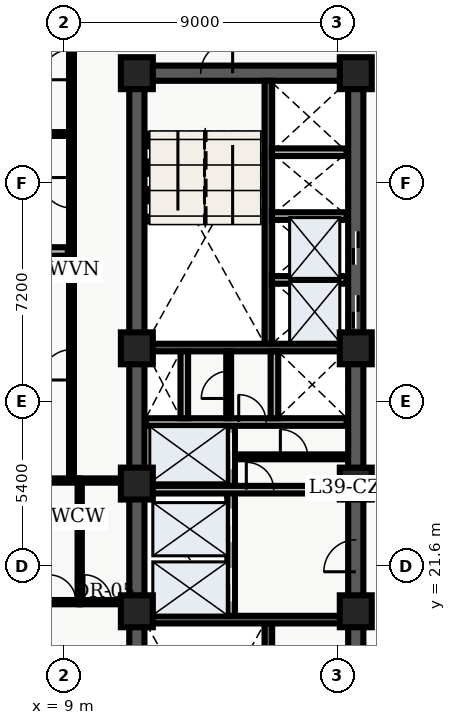
"""IFC4 building model, lengths in metres.
Left out: names, types, materials, properties, quantities, classifications, styles, units other than length and angle.
Written with IfcOpenShell. Run it as: python <this file> out.ifc"""

import sys

from ifc_helpers import new_model, entity, si_unit, converted_unit, direction, frame, origin_with_axes, origin_2d_with_axis, place, context, subcontext, project, spatial, polyline, rectangle, outline, extrude, element, fill, save


model = new_model("IFC4")
c1 = context("Model", 3, precision=1e-05, world=origin_with_axes(), true_north=direction((0.0, 1.0)))
c2 = subcontext(c1, "Body", "Model", "MODEL_VIEW")
j1 = project(units=[si_unit("LENGTHUNIT", "METRE"), converted_unit("PLANEANGLEUNIT", "DEGREE", entity("IfcPlaneAngleMeasure", 0.017), si_unit("PLANEANGLEUNIT", "RADIAN"), dimensions=[0, 0, 0, 0, 0, 0, 0])], contexts=[c1])
p1 = place(None, origin_with_axes())
s1 = spatial("IfcSite", under=j1, at=p1, CompositionType="ELEMENT")
p2 = place(p1, origin_with_axes())
s2 = spatial("IfcBuilding", under=s1, at=p2, CompositionType="ELEMENT")
p3 = place(p2, frame((0.0, 0.0, 160.2), z_axis=(0.0, 0.0, 1.0), x_axis=(1.0, 0.0, 0.0)))
s3 = spatial("IfcBuildingStorey", under=s2, at=p3, CompositionType="ELEMENT", Elevation=160.2)
p4 = place(p3, frame((11.4, 10.8, 0.0), z_axis=(0.0, 0.0, 1.0), x_axis=(0.0, 1.0, 0.0)))
e1 = element("IfcWall", 1, at=p4, inside=s3, PredefinedType="SHEAR", context=c2, shape_type="SweptSolid", body=[
    extrude(outline(polyline([(0.0, -0.25), (27.0, -0.25), (27.0, 0.25), (0.0, 0.25), (0.0, -0.25)])), origin_with_axes(), (0.0, 0.0, 1.0), 3.66),
])
p5 = place(p3, frame((11.4, 37.8, 0.0), z_axis=(0.0, 0.0, 1.0), x_axis=(1.0, 0.0, 0.0)))
e2 = element("IfcWall", 2, at=p5, inside=s3, PredefinedType="SHEAR", context=c2, shape_type="SweptSolid", body=[
    extrude(outline(polyline([(0.0, -0.25), (7.2, -0.25), (7.2, 0.25), (0.0, 0.25), (0.0, -0.25)])), origin_with_axes(), (0.0, 0.0, 1.0), 3.66),
])
p6 = place(p5, frame((2.625, 0.0, 0.0), z_axis=(0.0, 0.0, 1.0), x_axis=(1.0, 0.0, 0.0)))
e3 = element("IfcOpeningElement", 3, at=p6, cuts=e2, PredefinedType="OPENING", context=c2, shape_type="SweptSolid", body=[
    extrude(rectangle(XDim=1.05, YDim=0.52, at=origin_2d_with_axis()), origin_with_axes(), (0.0, 0.0, 1.0), 2.15),
])
p7 = place(p3, frame((18.6, 10.8, 0.0), z_axis=(0.0, 0.0, 1.0), x_axis=(0.0, 1.0, 0.0)))
e4 = element("IfcWall", 4, at=p7, inside=s3, PredefinedType="SHEAR", context=c2, shape_type="SweptSolid", body=[
    extrude(outline(polyline([(0.0, -0.25), (13.5, -0.25), (13.5, 0.25), (0.0, 0.25), (0.0, -0.25)])), origin_with_axes(), (0.0, 0.0, 1.0), 3.66),
])
p8 = place(p7, frame((11.125, 0.0, 0.0), z_axis=(0.0, 0.0, 1.0), x_axis=(1.0, 0.0, 0.0)))
e5 = element("IfcOpeningElement", 5, at=p8, cuts=e4, PredefinedType="OPENING", context=c2, shape_type="SweptSolid", body=[
    extrude(rectangle(XDim=1.05, YDim=0.52, at=origin_2d_with_axis()), origin_with_axes(), (0.0, 0.0, 1.0), 2.15),
])
p9 = place(p7, frame((2.425, 0.0, 0.0), z_axis=(0.0, 0.0, 1.0), x_axis=(1.0, 0.0, 0.0)))
e6 = element("IfcOpeningElement", 6, at=p9, cuts=e4, PredefinedType="OPENING", context=c2, shape_type="SweptSolid", body=[
    extrude(rectangle(XDim=1.05, YDim=0.52, at=origin_2d_with_axis()), origin_with_axes(), (0.0, 0.0, 1.0), 2.15),
])
p10 = place(p7, frame((6.625, 0.0, 0.0), z_axis=(0.0, 0.0, 1.0), x_axis=(1.0, 0.0, 0.0)))
e7 = element("IfcOpeningElement", 7, at=p10, cuts=e4, PredefinedType="OPENING", context=c2, shape_type="SweptSolid", body=[
    extrude(rectangle(XDim=1.05, YDim=0.52, at=origin_2d_with_axis()), origin_with_axes(), (0.0, 0.0, 1.0), 2.15),
])
p11 = place(p3, frame((18.6, 24.3, 0.0), z_axis=(0.0, 0.0, 1.0), x_axis=(0.0, 1.0, 0.0)))
e8 = element("IfcWall", 8, at=p11, inside=s3, PredefinedType="SHEAR", context=c2, shape_type="SweptSolid", body=[
    extrude(outline(polyline([(0.0, -0.25), (13.5, -0.25), (13.5, 0.25), (0.0, 0.25), (0.0, -0.25)])), origin_with_axes(), (0.0, 0.0, 1.0), 3.66),
])
p12 = place(p11, frame((5.65, 0.0, 0.0), z_axis=(0.0, 0.0, 1.0), x_axis=(1.0, 0.0, 0.0)))
e9 = element("IfcOpeningElement", 9, at=p12, cuts=e8, PredefinedType="OPENING", context=c2, shape_type="SweptSolid", body=[
    extrude(rectangle(XDim=1.1, YDim=0.52, at=origin_2d_with_axis()), origin_with_axes(), (0.0, 0.0, 1.0), 2.15),
])
p13 = place(p11, frame((7.75, 0.0, 0.0), z_axis=(0.0, 0.0, 1.0), x_axis=(1.0, 0.0, 0.0)))
e10 = element("IfcOpeningElement", 10, at=p13, cuts=e8, PredefinedType="OPENING", context=c2, shape_type="SweptSolid", body=[
    extrude(rectangle(XDim=1.1, YDim=0.52, at=origin_2d_with_axis()), origin_with_axes(), (0.0, 0.0, 1.0), 2.15),
])
p14 = place(p3, frame((15.725, 11.05, 0.0), z_axis=(0.0, 0.0, 1.0), x_axis=(0.0, 1.0, 0.0)))
e11 = element("IfcWall", 11, at=p14, inside=s3, PredefinedType="SHEAR", context=c2, shape_type="SweptSolid", body=[
    extrude(outline(polyline([(0.0, -0.125), (8.65, -0.125), (8.65, 0.125), (0.0, 0.125), (0.0, -0.125)])), origin_with_axes(), (0.0, 0.0, 1.0), 3.66),
])
p15 = place(p3, frame((11.65, 19.825, 0.0), z_axis=(0.0, 0.0, 1.0), x_axis=(1.0, 0.0, 0.0)))
e12 = element("IfcWall", 12, at=p15, inside=s3, PredefinedType="SHEAR", context=c2, shape_type="SweptSolid", body=[
    extrude(outline(polyline([(0.0, -0.125), (6.7, -0.125), (6.7, 0.125), (0.0, 0.125), (0.0, -0.125)])), origin_with_axes(), (0.0, 0.0, 1.0), 3.66),
])
p16 = place(p3, frame((15.725, 28.9, 0.0), z_axis=(0.0, 0.0, 1.0), x_axis=(0.0, 1.0, 0.0)))
e13 = element("IfcWall", 13, at=p16, inside=s3, PredefinedType="SHEAR", context=c2, shape_type="SweptSolid", body=[
    extrude(outline(polyline([(0.0, -0.125), (8.65, -0.125), (8.65, 0.125), (0.0, 0.125), (0.0, -0.125)])), origin_with_axes(), (0.0, 0.0, 1.0), 3.66),
])
p17 = place(p3, frame((11.65, 28.775, 0.0), z_axis=(0.0, 0.0, 1.0), x_axis=(1.0, 0.0, 0.0)))
e14 = element("IfcWall", 14, at=p17, inside=s3, PredefinedType="SHEAR", context=c2, shape_type="SweptSolid", body=[
    extrude(outline(polyline([(0.0, -0.125), (6.7, -0.125), (6.7, 0.125), (0.0, 0.125), (0.0, -0.125)])), origin_with_axes(), (0.0, 0.0, 1.0), 3.66),
])
p18 = place(p3, frame((14.5, 19.95, 0.0), z_axis=(0.0, 0.0, 1.0), x_axis=(0.0, 1.0, 0.0)))
e15 = element("IfcWall", 15, at=p18, inside=s3, PredefinedType="SOLIDWALL", context=c2, shape_type="SweptSolid", body=[
    extrude(outline(polyline([(0.0, -0.125), (6.25, -0.125), (6.25, 0.125), (0.0, 0.125), (0.0, -0.125)])), origin_with_axes(), (0.0, 0.0, 1.0), 2.7),
])
p19 = place(p18, frame((1.025, 0.0, 0.0), z_axis=(0.0, 0.0, 1.0), x_axis=(1.0, 0.0, 0.0)))
e16 = element("IfcOpeningElement", 16, at=p19, cuts=e15, PredefinedType="OPENING", context=c2, shape_type="SweptSolid", body=[
    extrude(rectangle(XDim=1.1, YDim=0.27, at=origin_2d_with_axis()), origin_with_axes(), (0.0, 0.0, 1.0), 2.15),
])
p20 = place(p18, frame((2.975, 0.0, 0.0), z_axis=(0.0, 0.0, 1.0), x_axis=(1.0, 0.0, 0.0)))
e17 = element("IfcOpeningElement", 17, at=p20, cuts=e15, PredefinedType="OPENING", context=c2, shape_type="SweptSolid", body=[
    extrude(rectangle(XDim=1.1, YDim=0.27, at=origin_2d_with_axis()), origin_with_axes(), (0.0, 0.0, 1.0), 2.15),
])
p21 = place(p18, frame((5.425, 0.0, 0.0), z_axis=(0.0, 0.0, 1.0), x_axis=(1.0, 0.0, 0.0)))
e18 = element("IfcOpeningElement", 18, at=p21, cuts=e15, PredefinedType="OPENING", context=c2, shape_type="SweptSolid", body=[
    extrude(rectangle(XDim=1.2, YDim=0.27, at=origin_2d_with_axis()), origin_with_axes(), (0.0, 0.0, 1.0), 2.15),
])
p22 = place(p3, frame((11.7, 24.1, 0.0), z_axis=(0.0, 0.0, 1.0), x_axis=(1.0, 0.0, 0.0)))
e19 = element("IfcWall", 19, at=p22, inside=s3, PredefinedType="SOLIDWALL", context=c2, shape_type="SweptSolid", body=[
    extrude(outline(polyline([(0.0, -0.125), (6.6, -0.125), (6.6, 0.125), (0.0, 0.125), (0.0, -0.125)])), origin_with_axes(), (0.0, 0.0, 1.0), 2.7),
])
p23 = place(p22, frame((3.75, 0.0, 0.0), z_axis=(0.0, 0.0, 1.0), x_axis=(1.0, 0.0, 0.0)))
e20 = element("IfcOpeningElement", 20, at=p23, cuts=e19, PredefinedType="OPENING", context=c2, shape_type="SweptSolid", body=[
    extrude(rectangle(XDim=0.9, YDim=0.27, at=origin_2d_with_axis()), origin_with_axes(), (0.0, 0.0, 1.0), 2.15),
])
p24 = place(p3, frame((11.7, 26.325, 0.0), z_axis=(0.0, 0.0, 1.0), x_axis=(1.0, 0.0, 0.0)))
e21 = element("IfcWall", 21, at=p24, inside=s3, PredefinedType="SOLIDWALL", context=c2, shape_type="SweptSolid", body=[
    extrude(outline(polyline([(0.0, -0.125), (6.6, -0.125), (6.6, 0.125), (0.0, 0.125), (0.0, -0.125)])), origin_with_axes(), (0.0, 0.0, 1.0), 2.7),
])
p25 = place(p24, frame((3.5, 0.0, 0.0), z_axis=(0.0, 0.0, 1.0), x_axis=(1.0, 0.0, 0.0)))
e22 = element("IfcOpeningElement", 22, at=p25, cuts=e21, PredefinedType="OPENING", context=c2, shape_type="SweptSolid", body=[
    extrude(rectangle(XDim=0.9, YDim=0.27, at=origin_2d_with_axis()), origin_with_axes(), (0.0, 0.0, 1.0), 2.15),
])
for number, where, z_axis, x_axis in (
    (23, (12.96, 26.45, 0.0), (0.0, 0.0, 1.0), (0.0, 1.0, 0.0)),
    (24, (15.925, 26.45, 0.0), (0.0, 0.0, 1.0), (0.0, 1.0, 0.0)),
):
    element("IfcWall", number, at=place(p3, frame(where, z_axis=z_axis, x_axis=x_axis)), inside=s3, PredefinedType="SOLIDWALL", context=c2, shape_type="SweptSolid", body=[
        extrude(outline(polyline([(0.0, -0.125), (2.2, -0.125), (2.2, 0.125), (0.0, 0.125), (0.0, -0.125)])), origin_with_axes(), (0.0, 0.0, 1.0), 2.7),
    ])
for number, where, z_axis, x_axis in (
    (25, (11.4, 20.1, 0.0), (0.0, 0.0, 1.0), (1.0, 0.0, 0.0)),
    (26, (11.4, 24.3, 0.0), (0.0, 0.0, 1.0), (1.0, 0.0, 0.0)),
    (27, (11.4, 28.75, 0.0), (0.0, 0.0, 1.0), (1.0, 0.0, 0.0)),
    (28, (11.4, 37.8, 0.0), (0.0, 0.0, 1.0), (1.0, 0.0, 0.0)),
    (29, (18.6, 20.1, 0.0), (0.0, 0.0, 1.0), (1.0, 0.0, 0.0)),
    (30, (18.6, 24.3, 0.0), (0.0, 0.0, 1.0), (1.0, 0.0, 0.0)),
    (31, (18.6, 28.75, 0.0), (0.0, 0.0, 1.0), (1.0, 0.0, 0.0)),
    (32, (18.6, 37.8, 0.0), (0.0, 0.0, 1.0), (1.0, 0.0, 0.0)),
):
    element("IfcColumn", number, at=place(p3, frame(where, z_axis=z_axis, x_axis=x_axis)), inside=s3, PredefinedType="COLUMN", context=c2, shape_type="SweptSolid", body=[
        extrude(rectangle(XDim=1.05, YDim=1.05, at=origin_2d_with_axis()), origin_with_axes(), (0.0, 0.0, 1.0), 3.9),
    ])
p26 = place(p3, frame((14.62, 25.18, 0.0), z_axis=(0.0, 0.0, 1.0), x_axis=(1.0, 0.0, 0.0)))
e33 = element("IfcWall", 33, at=p26, inside=s3, PredefinedType="PARTITIONING", context=c2, shape_type="SweptSolid", body=[
    extrude(outline(polyline([(0.0, -0.08), (3.68, -0.08), (3.68, 0.08), (0.0, 0.08), (0.0, -0.08)])), origin_with_axes(), (0.0, 0.0, 1.0), 2.7),
])
p27 = place(p26, frame((1.95, 0.0, 0.0), z_axis=(0.0, 0.0, 1.0), x_axis=(1.0, 0.0, 0.0)))
e34 = element("IfcOpeningElement", 34, at=p27, cuts=e33, PredefinedType="OPENING", context=c2, shape_type="SweptSolid", body=[
    extrude(rectangle(XDim=0.9, YDim=0.18, at=origin_2d_with_axis()), origin_with_axes(), (0.0, 0.0, 1.0), 2.15),
])
p28 = place(p3, frame((14.42, 26.45, 0.0), z_axis=(0.0, 0.0, 1.0), x_axis=(0.0, 1.0, 0.0)))
e35 = element("IfcWall", 35, at=p28, inside=s3, PredefinedType="PARTITIONING", context=c2, shape_type="SweptSolid", body=[
    extrude(outline(polyline([(0.0, -0.08), (2.2, -0.08), (2.2, 0.08), (0.0, 0.08), (0.0, -0.08)])), origin_with_axes(), (0.0, 0.0, 1.0), 2.7),
])
p29 = place(p28, frame((1.1, 0.0, 0.0), z_axis=(0.0, 0.0, 1.0), x_axis=(1.0, 0.0, 0.0)))
e36 = element("IfcOpeningElement", 36, at=p29, cuts=e35, PredefinedType="OPENING", context=c2, shape_type="SweptSolid", body=[
    extrude(rectangle(XDim=0.9, YDim=0.18, at=origin_2d_with_axis()), origin_with_axes(), (0.0, 0.0, 1.0), 2.15),
])
for number, where, z_axis, x_axis in (
    (37, (15.84, 31.0, 0.0), (0.0, 0.0, 1.0), (1.0, 0.0, 0.0)),
    (38, (15.84, 33.1, 0.0), (0.0, 0.0, 1.0), (1.0, 0.0, 0.0)),
    (39, (15.84, 35.2, 0.0), (0.0, 0.0, 1.0), (1.0, 0.0, 0.0)),
):
    element("IfcWall", number, at=place(p3, frame(where, z_axis=z_axis, x_axis=x_axis)), inside=s3, PredefinedType="SOLIDWALL", context=c2, shape_type="SweptSolid", body=[
        extrude(outline(polyline([(0.0, -0.125), (2.46, -0.125), (2.46, 0.125), (0.0, 0.125), (0.0, -0.125)])), origin_with_axes(), (0.0, 0.0, 1.0), 2.7),
    ])
p30 = place(p3, frame((9.52, 20.4, 0.0), z_axis=(0.0, 0.0, 1.0), x_axis=(0.0, 1.0, 0.0)))
e40 = element("IfcWall", 40, at=p30, inside=s3, PredefinedType="PARTITIONING", context=c2, shape_type="SweptSolid", body=[
    extrude(outline(polyline([(0.0, -0.07), (4.0, -0.07), (4.0, 0.07), (0.0, 0.07), (0.0, -0.07)])), origin_with_axes(), (0.0, 0.0, 1.0), 2.7),
])
p31 = place(p3, frame((9.52, 20.4, 0.0), z_axis=(0.0, 0.0, 1.0), x_axis=(1.0, 0.0, 0.0)))
e41 = element("IfcWall", 41, at=p31, inside=s3, PredefinedType="PARTITIONING", context=c2, shape_type="SweptSolid", body=[
    extrude(outline(polyline([(0.0, -0.07), (1.58, -0.07), (1.58, 0.07), (0.0, 0.07), (0.0, -0.07)])), origin_with_axes(), (0.0, 0.0, 1.0), 2.7),
])
p32 = place(p31, frame((0.59, 0.0, 0.0), z_axis=(0.0, 0.0, 1.0), x_axis=(1.0, 0.0, 0.0)))
e42 = element("IfcOpeningElement", 42, at=p32, cuts=e41, PredefinedType="OPENING", context=c2, shape_type="SweptSolid", body=[
    extrude(rectangle(XDim=0.9, YDim=0.16, at=origin_2d_with_axis()), origin_with_axes(), (0.0, 0.0, 1.0), 2.15),
])
p33 = place(p3, frame((9.52, 24.4, 0.0), z_axis=(0.0, 0.0, 1.0), x_axis=(1.0, 0.0, 0.0)))
e43 = element("IfcWall", 43, at=p33, inside=s3, PredefinedType="PARTITIONING", context=c2, shape_type="SweptSolid", body=[
    extrude(outline(polyline([(0.0, -0.07), (1.58, -0.07), (1.58, 0.07), (0.0, 0.07), (0.0, -0.07)])), origin_with_axes(), (0.0, 0.0, 1.0), 2.7),
])
p34 = place(p3, frame((9.25, 24.4, 0.0), z_axis=(0.0, 0.0, 1.0), x_axis=(0.0, 1.0, 0.0)))
e44 = element("IfcWall", 44, at=p34, inside=s3, PredefinedType="PARTITIONING", context=c2, shape_type="SweptSolid", body=[
    extrude(outline(polyline([(0.0, -0.08), (16.1, -0.08), (16.1, 0.08), (0.0, 0.08), (0.0, -0.08)])), origin_with_axes(), (0.0, 0.0, 1.0), 2.7),
])
p35 = place(p34, frame((3.808, 0.0, 0.0), z_axis=(0.0, 0.0, 1.0), x_axis=(1.0, 0.0, 0.0)))
e45 = element("IfcOpeningElement", 45, at=p35, cuts=e44, PredefinedType="OPENING", context=c2, shape_type="SweptSolid", body=[
    extrude(rectangle(XDim=1.0, YDim=0.18, at=origin_2d_with_axis()), origin_with_axes(), (0.0, 0.0, 1.0), 2.15),
])
p36 = place(p34, frame((9.467, 0.0, 0.0), z_axis=(0.0, 0.0, 1.0), x_axis=(1.0, 0.0, 0.0)))
e46 = element("IfcOpeningElement", 46, at=p36, cuts=e44, PredefinedType="OPENING", context=c2, shape_type="SweptSolid", body=[
    extrude(rectangle(XDim=1.0, YDim=0.18, at=origin_2d_with_axis()), origin_with_axes(), (0.0, 0.0, 1.0), 2.15),
])
p37 = place(p34, frame((13.684, 0.0, 0.0), z_axis=(0.0, 0.0, 1.0), x_axis=(1.0, 0.0, 0.0)))
e47 = element("IfcOpeningElement", 47, at=p37, cuts=e44, PredefinedType="OPENING", context=c2, shape_type="SweptSolid", body=[
    extrude(rectangle(XDim=1.0, YDim=0.18, at=origin_2d_with_axis()), origin_with_axes(), (0.0, 0.0, 1.0), 2.15),
])
p38 = place(p3, frame((0.335, 20.4, 0.0), z_axis=(0.0, 0.0, 1.0), x_axis=(1.0, 0.0, 0.0)))
e48 = element("IfcWall", 48, at=p38, inside=s3, PredefinedType="PARTITIONING", context=c2, shape_type="SweptSolid", body=[
    extrude(outline(polyline([(0.0, -0.07), (9.185, -0.07), (9.185, 0.07), (0.0, 0.07), (0.0, -0.07)])), origin_with_axes(), (0.0, 0.0, 1.0), 2.7),
])
p39 = place(p38, frame((8.615, 0.0, 0.0), z_axis=(0.0, 0.0, 1.0), x_axis=(1.0, 0.0, 0.0)))
e49 = element("IfcOpeningElement", 49, at=p39, cuts=e48, PredefinedType="OPENING", context=c2, shape_type="SweptSolid", body=[
    extrude(rectangle(XDim=0.9, YDim=0.16, at=origin_2d_with_axis()), origin_with_axes(), (0.0, 0.0, 1.0), 2.15),
])
p40 = place(p3, frame((0.335, 24.4, 0.0), z_axis=(0.0, 0.0, 1.0), x_axis=(1.0, 0.0, 0.0)))
e50 = element("IfcWall", 50, at=p40, inside=s3, PredefinedType="PARTITIONING", context=c2, shape_type="SweptSolid", body=[
    extrude(outline(polyline([(0.0, -0.07), (9.185, -0.07), (9.185, 0.07), (0.0, 0.07), (0.0, -0.07)])), origin_with_axes(), (0.0, 0.0, 1.0), 2.7),
])
p41 = place(p3, frame((0.335, 31.935, 0.0), z_axis=(0.0, 0.0, 1.0), x_axis=(1.0, 0.0, 0.0)))
e51 = element("IfcWall", 51, at=p41, inside=s3, PredefinedType="PARTITIONING", context=c2, shape_type="SweptSolid", body=[
    extrude(outline(polyline([(0.0, -0.14), (8.795, -0.14), (8.795, 0.14), (0.0, 0.14), (0.0, -0.14)])), origin_with_axes(), (0.0, 0.0, 1.0), 2.7),
])
p42 = place(p3, frame((0.335, 35.799, 0.0), z_axis=(0.0, 0.0, 1.0), x_axis=(1.0, 0.0, 0.0)))
e52 = element("IfcWall", 52, at=p42, inside=s3, PredefinedType="PARTITIONING", context=c2, shape_type="SweptSolid", body=[
    extrude(outline(polyline([(0.0, -0.062), (8.795, -0.062), (8.795, 0.062), (0.0, 0.062), (0.0, -0.062)])), origin_with_axes(), (0.0, 0.0, 1.0), 2.7),
])
p43 = place(p11, frame((5.65, 0.0, 0.0), z_axis=(0.0, 0.0, 1.0), x_axis=(1.0, 0.0, 0.0)))
e53 = element("IfcDoor", 53, at=p43, inside=s3, OperationType="SLIDING_TO_LEFT", PredefinedType="DOOR", context=c2, shape_type="SweptSolid", body=[
    extrude(rectangle(XDim=1.1, YDim=0.09, at=origin_2d_with_axis()), origin_with_axes(), (0.0, 0.0, 1.0), 2.15),
])
fill(e9, e53)
p44 = place(p11, frame((7.75, 0.0, 0.0), z_axis=(0.0, 0.0, 1.0), x_axis=(1.0, 0.0, 0.0)))
e54 = element("IfcDoor", 54, at=p44, inside=s3, OperationType="SLIDING_TO_RIGHT", PredefinedType="DOOR", context=c2, shape_type="SweptSolid", body=[
    extrude(rectangle(XDim=1.1, YDim=0.09, at=origin_2d_with_axis()), origin_with_axes(), (0.0, 0.0, 1.0), 2.15),
])
fill(e10, e54)
p45 = place(p18, frame((1.025, 0.0, 0.0), z_axis=(0.0, 0.0, 1.0), x_axis=(1.0, 0.0, 0.0)))
e55 = element("IfcDoor", 55, at=p45, inside=s3, OperationType="SLIDING_TO_LEFT", PredefinedType="DOOR", context=c2, shape_type="SweptSolid", body=[
    extrude(rectangle(XDim=1.1, YDim=0.09, at=origin_2d_with_axis()), origin_with_axes(), (0.0, 0.0, 1.0), 2.15),
])
fill(e16, e55)
p46 = place(p18, frame((2.975, 0.0, 0.0), z_axis=(0.0, 0.0, 1.0), x_axis=(1.0, 0.0, 0.0)))
e56 = element("IfcDoor", 56, at=p46, inside=s3, OperationType="SLIDING_TO_RIGHT", PredefinedType="DOOR", context=c2, shape_type="SweptSolid", body=[
    extrude(rectangle(XDim=1.1, YDim=0.09, at=origin_2d_with_axis()), origin_with_axes(), (0.0, 0.0, 1.0), 2.15),
])
fill(e17, e56)
p47 = place(p18, frame((5.425, 0.0, 0.0), z_axis=(0.0, 0.0, 1.0), x_axis=(1.0, 0.0, 0.0)))
e57 = element("IfcDoor", 57, at=p47, inside=s3, OperationType="DOUBLE_DOOR_SLIDING", PredefinedType="DOOR", context=c2, shape_type="SweptSolid", body=[
    extrude(rectangle(XDim=1.2, YDim=0.09, at=origin_2d_with_axis()), origin_with_axes(), (0.0, 0.0, 1.0), 2.15),
])
fill(e18, e57)
p48 = place(p5, frame((2.625, 0.0, 0.0), z_axis=(0.0, 0.0, 1.0), x_axis=(1.0, 0.0, 0.0)))
e58 = element("IfcDoor", 58, at=p48, inside=s3, OperationType="SINGLE_SWING_RIGHT", PredefinedType="DOOR", context=c2, shape_type="SweptSolid", body=[
    extrude(rectangle(XDim=1.05, YDim=0.09, at=origin_2d_with_axis()), origin_with_axes(), (0.0, 0.0, 1.0), 2.15),
])
fill(e3, e58)
p49 = place(p7, frame((11.125, 0.0, 0.0), z_axis=(0.0, 0.0, 1.0), x_axis=(1.0, 0.0, 0.0)))
e59 = element("IfcDoor", 59, at=p49, inside=s3, OperationType="SINGLE_SWING_LEFT", PredefinedType="DOOR", context=c2, shape_type="SweptSolid", body=[
    extrude(rectangle(XDim=1.05, YDim=0.09, at=origin_2d_with_axis()), origin_with_axes(), (0.0, 0.0, 1.0), 2.15),
])
fill(e5, e59)
p50 = place(p24, frame((3.5, 0.0, 0.0), z_axis=(0.0, 0.0, 1.0), x_axis=(1.0, 0.0, 0.0)))
e60 = element("IfcDoor", 60, at=p50, inside=s3, OperationType="SINGLE_SWING_LEFT", PredefinedType="DOOR", context=c2, shape_type="SweptSolid", body=[
    extrude(rectangle(XDim=0.9, YDim=0.09, at=origin_2d_with_axis()), origin_with_axes(), (0.0, 0.0, 1.0), 2.15),
])
fill(e22, e60)
p51 = place(p28, frame((1.1, 0.0, 0.0), z_axis=(0.0, 0.0, 1.0), x_axis=(1.0, 0.0, 0.0)))
e61 = element("IfcDoor", 61, at=p51, inside=s3, OperationType="SINGLE_SWING_LEFT", PredefinedType="DOOR", context=c2, shape_type="SweptSolid", body=[
    extrude(rectangle(XDim=0.9, YDim=0.09, at=origin_2d_with_axis()), origin_with_axes(), (0.0, 0.0, 1.0), 2.15),
])
fill(e36, e61)
p52 = place(p22, frame((3.75, 0.0, 0.0), z_axis=(0.0, 0.0, 1.0), x_axis=(1.0, 0.0, 0.0)))
e62 = element("IfcDoor", 62, at=p52, inside=s3, OperationType="SINGLE_SWING_LEFT", PredefinedType="DOOR", context=c2, shape_type="SweptSolid", body=[
    extrude(rectangle(XDim=0.9, YDim=0.09, at=origin_2d_with_axis()), origin_with_axes(), (0.0, 0.0, 1.0), 2.15),
])
fill(e20, e62)
p53 = place(p26, frame((1.95, 0.0, 0.0), z_axis=(0.0, 0.0, 1.0), x_axis=(1.0, 0.0, 0.0)))
e63 = element("IfcDoor", 63, at=p53, inside=s3, OperationType="SINGLE_SWING_LEFT", PredefinedType="DOOR", context=c2, shape_type="SweptSolid", body=[
    extrude(rectangle(XDim=0.9, YDim=0.09, at=origin_2d_with_axis()), origin_with_axes(), (0.0, 0.0, 1.0), 2.15),
])
fill(e34, e63)
p54 = place(p31, frame((0.59, 0.0, 0.0), z_axis=(0.0, 0.0, 1.0), x_axis=(1.0, 0.0, 0.0)))
e64 = element("IfcDoor", 64, at=p54, inside=s3, OperationType="SINGLE_SWING_LEFT", PredefinedType="DOOR", context=c2, shape_type="SweptSolid", body=[
    extrude(rectangle(XDim=0.9, YDim=0.084, at=origin_2d_with_axis()), origin_with_axes(), (0.0, 0.0, 1.0), 2.15),
])
fill(e42, e64)
p55 = place(p38, frame((8.615, 0.0, 0.0), z_axis=(0.0, 0.0, 1.0), x_axis=(1.0, 0.0, 0.0)))
e65 = element("IfcDoor", 65, at=p55, inside=s3, OperationType="SINGLE_SWING_LEFT", PredefinedType="DOOR", context=c2, shape_type="SweptSolid", body=[
    extrude(rectangle(XDim=0.9, YDim=0.084, at=origin_2d_with_axis()), origin_with_axes(), (0.0, 0.0, 1.0), 2.15),
])
fill(e49, e65)
p56 = place(p34, frame((3.808, 0.0, 0.0), z_axis=(0.0, 0.0, 1.0), x_axis=(1.0, 0.0, 0.0)))
e66 = element("IfcDoor", 66, at=p56, inside=s3, OperationType="SINGLE_SWING_LEFT", PredefinedType="DOOR", context=c2, shape_type="SweptSolid", body=[
    extrude(rectangle(XDim=1.0, YDim=0.09, at=origin_2d_with_axis()), origin_with_axes(), (0.0, 0.0, 1.0), 2.15),
])
fill(e45, e66)
p57 = place(p34, frame((9.467, 0.0, 0.0), z_axis=(0.0, 0.0, 1.0), x_axis=(1.0, 0.0, 0.0)))
e67 = element("IfcDoor", 67, at=p57, inside=s3, OperationType="SINGLE_SWING_RIGHT", PredefinedType="DOOR", context=c2, shape_type="SweptSolid", body=[
    extrude(rectangle(XDim=1.0, YDim=0.09, at=origin_2d_with_axis()), origin_with_axes(), (0.0, 0.0, 1.0), 2.15),
])
fill(e46, e67)
p58 = place(p34, frame((13.684, 0.0, 0.0), z_axis=(0.0, 0.0, 1.0), x_axis=(1.0, 0.0, 0.0)))
e68 = element("IfcDoor", 68, at=p58, inside=s3, OperationType="SINGLE_SWING_LEFT", PredefinedType="DOOR", context=c2, shape_type="SweptSolid", body=[
    extrude(rectangle(XDim=1.0, YDim=0.09, at=origin_2d_with_axis()), origin_with_axes(), (0.0, 0.0, 1.0), 2.15),
])
fill(e47, e68)
save(model, sys.argv[1])
